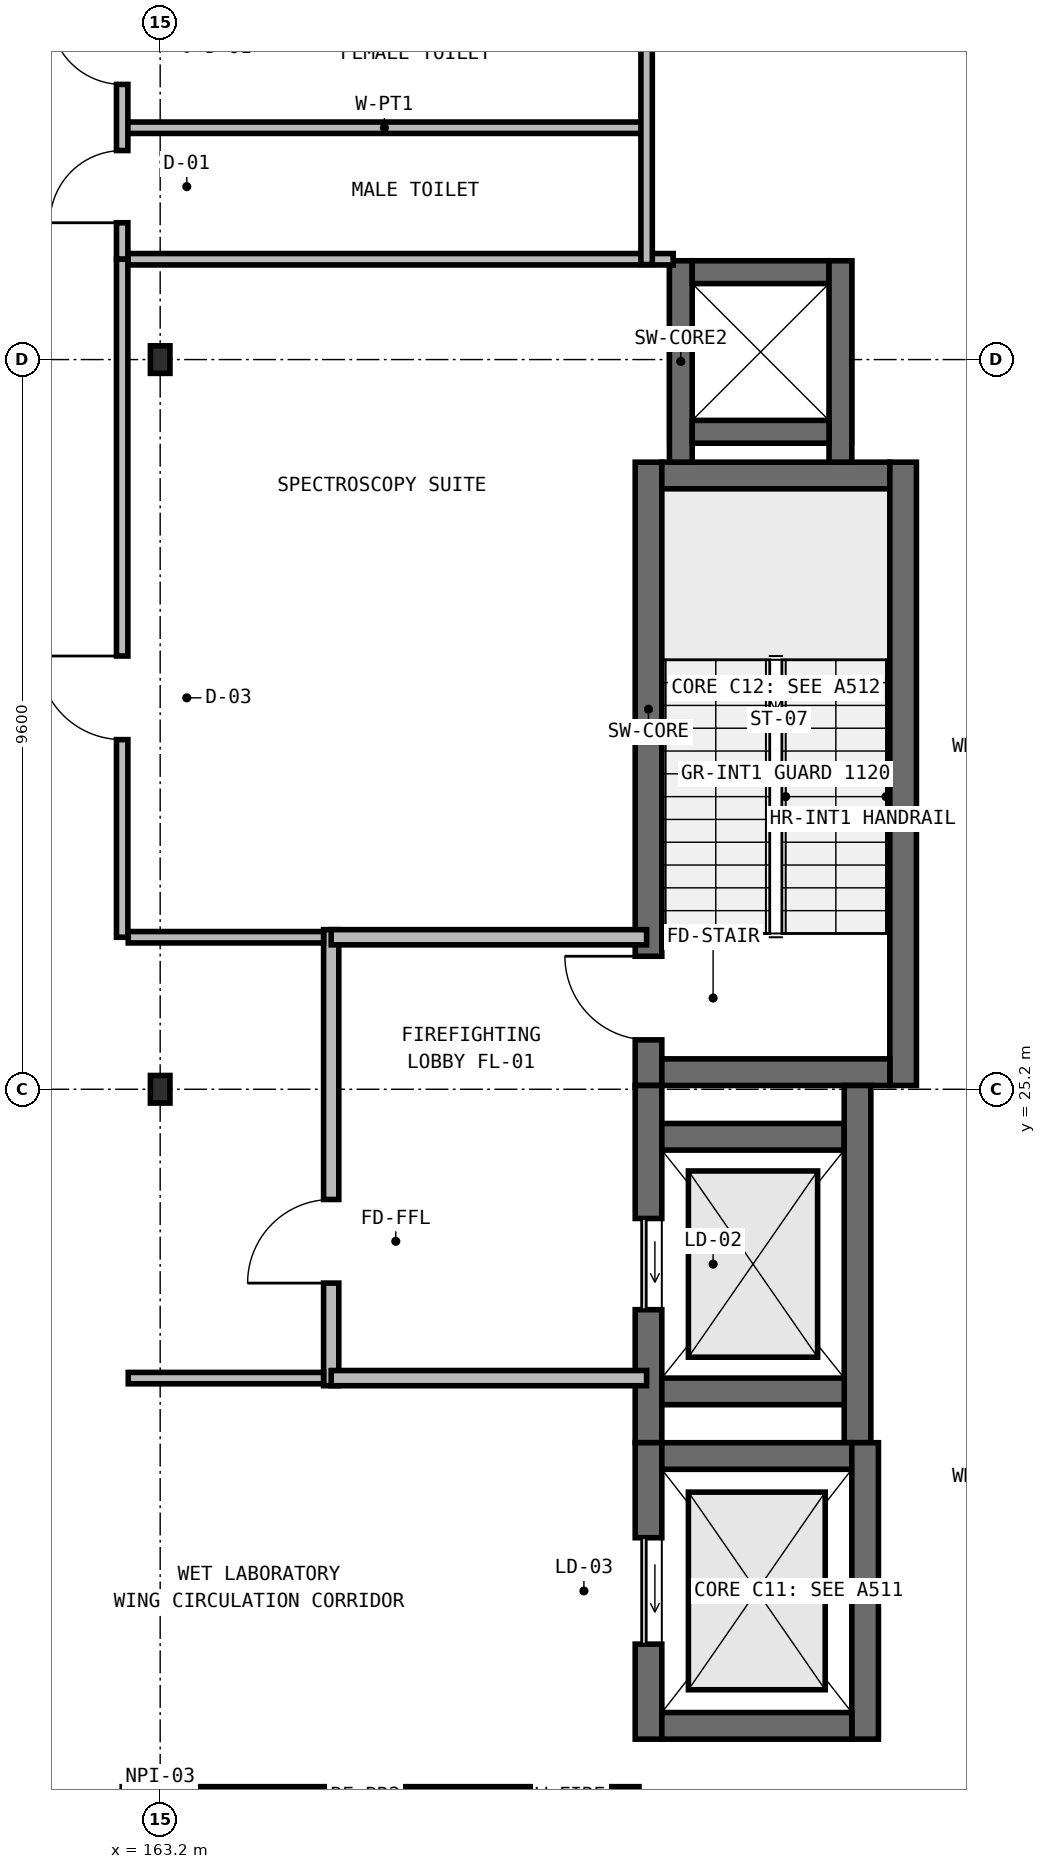
"""IFC4 building model, lengths in metres.
Left out: names, types, materials, properties, quantities, classifications, styles, units other than length and angle.
Written with IfcOpenShell. Run it as: python <this file> out.ifc"""

import sys

from ifc_helpers import new_model, si_unit, direction, frame, frame_2d, origin, origin_2d, place, context, subcontext, project, spatial, rectangle, i_section, extrude, element, fill, save


model = new_model("IFC4")
c1 = context("Model", 3, precision=1e-05, world=origin(), true_north=direction((0.0, 1.0)))
c2 = subcontext(c1, "Body", "Model", "MODEL_VIEW")
j1 = project(units=[si_unit("LENGTHUNIT", "METRE"), si_unit("PLANEANGLEUNIT", "RADIAN")], contexts=[c1])
p1 = place(None, origin())
s1 = spatial("IfcSite", under=j1, at=p1, CompositionType="ELEMENT")
p2 = place(p1, origin())
s2 = spatial("IfcBuilding", under=s1, at=p2, CompositionType="ELEMENT")
p3 = place(p2, frame((0.0, 0.0, 32.55)))
s3 = spatial("IfcBuildingStorey", under=s2, at=p3, CompositionType="ELEMENT", Elevation=32.55)
p4 = place(p3, frame((169.625, 25.25, 0.0), z_axis=(0.0, 0.0, 1.0), x_axis=(0.0, 1.0, 0.0)))
e1 = element("IfcWall", 1, at=p4, inside=s3, PredefinedType="SHEAR", context=c2, shape_type="SweptSolid", body=[
    extrude(rectangle(XDim=8.2, YDim=0.35, at=frame_2d((4.1, 0.0))), origin(), (0.0, 0.0, 1.0), 4.55),
])
p5 = place(p4, frame((0.6, 0.0, 0.0)))
e2 = element("IfcOpeningElement", 2, at=p5, cuts=e1, PredefinedType="OPENING", context=c2, shape_type="SweptSolid", body=[
    extrude(rectangle(XDim=1.1, YDim=2.15, at=frame_2d((0.55, 1.075))), frame((0.0, 0.185, 0.0), z_axis=(0.0, -1.0, 0.0), x_axis=(1.0, 0.0, 0.0)), (0.0, 0.0, 1.0), 0.37),
])
p6 = place(p3, frame((169.8, 33.275, 0.0), z_axis=(0.0, 0.0, 1.0), x_axis=(1.0, 0.0, 0.0)))
e3 = element("IfcWall", 3, at=p6, inside=s3, PredefinedType="SHEAR", context=c2, shape_type="SweptSolid", body=[
    extrude(rectangle(XDim=3.0, YDim=0.35, at=frame_2d((1.5, 0.0))), origin(), (0.0, 0.0, 1.0), 4.55),
])
p7 = place(p3, frame((172.975, 33.45, 0.0), z_axis=(0.0, 0.0, 1.0), x_axis=(0.0, -1.0, 0.0)))
e4 = element("IfcWall", 4, at=p7, inside=s3, PredefinedType="SHEAR", context=c2, shape_type="SweptSolid", body=[
    extrude(rectangle(XDim=8.2, YDim=0.35, at=frame_2d((4.1, 0.0))), origin(), (0.0, 0.0, 1.0), 4.55),
])
p8 = place(p3, frame((172.8, 25.425, 0.0), z_axis=(0.0, 0.0, 1.0), x_axis=(-1.0, 0.0, 0.0)))
e5 = element("IfcWall", 5, at=p8, inside=s3, PredefinedType="SHEAR", context=c2, shape_type="SweptSolid", body=[
    extrude(rectangle(XDim=3.0, YDim=0.35, at=frame_2d((1.5, 0.0))), origin(), (0.0, 0.0, 1.0), 4.55),
])
p9 = place(p3, frame((169.625, 20.55, 0.0), z_axis=(0.0, 0.0, 1.0), x_axis=(0.0, 1.0, 0.0)))
e6 = element("IfcWall", 6, at=p9, inside=s3, PredefinedType="SHEAR", context=c2, shape_type="SweptSolid", body=[
    extrude(rectangle(XDim=4.7, YDim=0.35, at=frame_2d((2.35, 0.0))), origin(), (0.0, 0.0, 1.0), 4.55),
])
p10 = place(p9, frame((1.75, 0.0, 0.0)))
e7 = element("IfcOpeningElement", 7, at=p10, cuts=e6, PredefinedType="OPENING", context=c2, shape_type="SweptSolid", body=[
    extrude(rectangle(XDim=1.2, YDim=2.15, at=frame_2d((0.6, 1.075))), frame((0.0, 0.185, 0.0), z_axis=(0.0, -1.0, 0.0), x_axis=(1.0, 0.0, 0.0)), (0.0, 0.0, 1.0), 0.37),
])
p11 = place(p3, frame((169.8, 24.575, 0.0), z_axis=(0.0, 0.0, 1.0), x_axis=(1.0, 0.0, 0.0)))
e8 = element("IfcWall", 8, at=p11, inside=s3, PredefinedType="SHEAR", context=c2, shape_type="SweptSolid", body=[
    extrude(rectangle(XDim=2.4, YDim=0.35, at=frame_2d((1.2, 0.0))), origin(), (0.0, 0.0, 1.0), 4.55),
])
p12 = place(p3, frame((172.375, 25.25, 0.0), z_axis=(0.0, 0.0, 1.0), x_axis=(0.0, -1.0, 0.0)))
e9 = element("IfcWall", 9, at=p12, inside=s3, PredefinedType="SHEAR", context=c2, shape_type="SweptSolid", body=[
    extrude(rectangle(XDim=4.7, YDim=0.35, at=frame_2d((2.35, 0.0))), origin(), (0.0, 0.0, 1.0), 4.55),
])
p13 = place(p3, frame((172.2, 21.225, 0.0), z_axis=(0.0, 0.0, 1.0), x_axis=(-1.0, 0.0, 0.0)))
e10 = element("IfcWall", 10, at=p13, inside=s3, PredefinedType="SHEAR", context=c2, shape_type="SweptSolid", body=[
    extrude(rectangle(XDim=2.4, YDim=0.35, at=frame_2d((1.2, 0.0))), origin(), (0.0, 0.0, 1.0), 4.55),
])
p14 = place(p3, frame((169.625, 16.65, 0.0), z_axis=(0.0, 0.0, 1.0), x_axis=(0.0, 1.0, 0.0)))
e11 = element("IfcWall", 11, at=p14, inside=s3, PredefinedType="SHEAR", context=c2, shape_type="SweptSolid", body=[
    extrude(rectangle(XDim=3.9, YDim=0.35, at=frame_2d((1.95, 0.0))), origin(), (0.0, 0.0, 1.0), 4.55),
])
p15 = place(p14, frame((1.25, 0.0, 0.0)))
e12 = element("IfcOpeningElement", 12, at=p15, cuts=e11, PredefinedType="OPENING", context=c2, shape_type="SweptSolid", body=[
    extrude(rectangle(XDim=1.4, YDim=2.3, at=frame_2d((0.7, 1.15))), frame((0.0, 0.185, 0.0), z_axis=(0.0, -1.0, 0.0), x_axis=(1.0, 0.0, 0.0)), (0.0, 0.0, 1.0), 0.37),
])
p16 = place(p3, frame((169.8, 20.375, 0.0), z_axis=(0.0, 0.0, 1.0), x_axis=(1.0, 0.0, 0.0)))
e13 = element("IfcWall", 13, at=p16, inside=s3, PredefinedType="SHEAR", context=c2, shape_type="SweptSolid", body=[
    extrude(rectangle(XDim=2.5, YDim=0.35, at=frame_2d((1.25, 0.0))), origin(), (0.0, 0.0, 1.0), 4.55),
])
p17 = place(p3, frame((172.475, 20.55, 0.0), z_axis=(0.0, 0.0, 1.0), x_axis=(0.0, -1.0, 0.0)))
e14 = element("IfcWall", 14, at=p17, inside=s3, PredefinedType="SHEAR", context=c2, shape_type="SweptSolid", body=[
    extrude(rectangle(XDim=3.9, YDim=0.35, at=frame_2d((1.95, 0.0))), origin(), (0.0, 0.0, 1.0), 4.55),
])
p18 = place(p3, frame((172.3, 16.825, 0.0), z_axis=(0.0, 0.0, 1.0), x_axis=(-1.0, 0.0, 0.0)))
e15 = element("IfcWall", 15, at=p18, inside=s3, PredefinedType="SHEAR", context=c2, shape_type="SweptSolid", body=[
    extrude(rectangle(XDim=2.5, YDim=0.35, at=frame_2d((1.25, 0.0))), origin(), (0.0, 0.0, 1.0), 4.55),
])
for number, where, z_axis, x_axis in (
    (16, (163.2, 25.2, 0.0), (0.0, 0.0, 1.0), (1.0, 0.0, 0.0)),
    (17, (163.2, 34.8, 0.0), (0.0, 0.0, 1.0), (1.0, 0.0, 0.0)),
):
    element("IfcColumn", number, at=place(p3, frame(where, z_axis=z_axis, x_axis=x_axis)), inside=s3, PredefinedType="COLUMN", context=c2, shape_type="SweptSolid", body=[
        extrude(i_section(OverallWidth=0.257, OverallDepth=0.363, WebThickness=0.013, FlangeThickness=0.022, at=origin_2d()), origin(), (0.0, 0.0, 1.0), 4.55),
    ])
p19 = place(p3, frame((170.05, 33.45, 0.0), z_axis=(0.0, 0.0, 1.0), x_axis=(0.0, 1.0, 0.0)))
e18 = element("IfcWall", 18, at=p19, inside=s3, PredefinedType="SHEAR", context=c2, shape_type="SweptSolid", body=[
    extrude(rectangle(XDim=2.65, YDim=0.3, at=frame_2d((1.325, 0.0))), origin(), (0.0, 0.0, 1.0), 4.37),
])
p20 = place(p3, frame((170.2, 35.95, 0.0), z_axis=(0.0, 0.0, 1.0), x_axis=(1.0, 0.0, 0.0)))
e19 = element("IfcWall", 19, at=p20, inside=s3, PredefinedType="SHEAR", context=c2, shape_type="SweptSolid", body=[
    extrude(rectangle(XDim=1.8, YDim=0.3, at=frame_2d((0.9, 0.0))), origin(), (0.0, 0.0, 1.0), 4.37),
])
p21 = place(p3, frame((172.15, 36.1, 0.0), z_axis=(0.0, 0.0, 1.0), x_axis=(0.0, -1.0, 0.0)))
e20 = element("IfcWall", 20, at=p21, inside=s3, PredefinedType="SHEAR", context=c2, shape_type="SweptSolid", body=[
    extrude(rectangle(XDim=2.65, YDim=0.3, at=frame_2d((1.325, 0.0))), origin(), (0.0, 0.0, 1.0), 4.37),
])
p22 = place(p3, frame((172.0, 33.85, 0.0), z_axis=(0.0, 0.0, 1.0), x_axis=(-1.0, 0.0, 0.0)))
e21 = element("IfcWall", 21, at=p22, inside=s3, PredefinedType="SHEAR", context=c2, shape_type="SweptSolid", body=[
    extrude(rectangle(XDim=1.8, YDim=0.3, at=frame_2d((0.9, 0.0))), origin(), (0.0, 0.0, 1.0), 4.37),
])
p23 = place(p3, frame((165.45, 21.3, 0.0), z_axis=(0.0, 0.0, 1.0), x_axis=(0.0, 1.0, 0.0)))
e22 = element("IfcWall", 22, at=p23, inside=s3, PredefinedType="SOLIDWALL", context=c2, shape_type="SweptSolid", body=[
    extrude(rectangle(XDim=6.0, YDim=0.2, at=frame_2d((3.0, 0.0))), origin(), (0.0, 0.0, 1.0), 4.3),
])
p24 = place(p23, frame((1.35, 0.0, 0.0)))
e23 = element("IfcOpeningElement", 23, at=p24, cuts=e22, PredefinedType="OPENING", context=c2, shape_type="SweptSolid", body=[
    extrude(rectangle(XDim=1.1, YDim=2.15, at=frame_2d((0.55, 1.075))), frame((0.0, 0.11, 0.0), z_axis=(0.0, -1.0, 0.0), x_axis=(1.0, 0.0, 0.0)), (0.0, 0.0, 1.0), 0.22),
])
for number, where, z_axis, x_axis in (
    (24, (165.45, 21.4, 0.0), (0.0, 0.0, 1.0), (1.0, 0.0, 0.0)),
    (25, (165.45, 27.2, 0.0), (0.0, 0.0, 1.0), (1.0, 0.0, 0.0)),
):
    element("IfcWall", number, at=place(p3, frame(where, z_axis=z_axis, x_axis=x_axis)), inside=s3, PredefinedType="SOLIDWALL", context=c2, shape_type="SweptSolid", body=[
        extrude(rectangle(XDim=4.15, YDim=0.2, at=frame_2d((2.075, 0.0))), origin(), (0.0, 0.0, 1.0), 4.3),
    ])
p25 = place(p3, frame((162.7, 37.85, 0.0), z_axis=(0.0, 0.0, 1.0), x_axis=(1.0, 0.0, 0.0)))
e26 = element("IfcWall", 26, at=p25, inside=s3, PredefinedType="PARTITIONING", context=c2, shape_type="SweptSolid", body=[
    extrude(rectangle(XDim=6.9, YDim=0.15, at=frame_2d((3.45, 0.0))), origin(), (0.0, 0.0, 1.0), 4.3),
])
p26 = place(p3, frame((162.7, 36.12, 0.0), z_axis=(0.0, 0.0, 1.0), x_axis=(1.0, 0.0, 0.0)))
e27 = element("IfcWall", 27, at=p26, inside=s3, PredefinedType="PARTITIONING", context=c2, shape_type="SweptSolid", body=[
    extrude(rectangle(XDim=7.25, YDim=0.15, at=frame_2d((3.625, 0.0))), origin(), (0.0, 0.0, 1.0), 4.3),
])
p27 = place(p3, frame((169.6, 36.05, 0.0), z_axis=(0.0, 0.0, 1.0), x_axis=(0.0, 1.0, 0.0)))
e28 = element("IfcWall", 28, at=p27, inside=s3, PredefinedType="PARTITIONING", context=c2, shape_type="SweptSolid", body=[
    extrude(rectangle(XDim=5.5, YDim=0.15, at=frame_2d((2.75, 0.0))), origin(), (0.0, 0.0, 1.0), 4.3),
])
p28 = place(p3, frame((162.7, 36.12, 0.0), z_axis=(0.0, 0.0, 1.0), x_axis=(0.0, 1.0, 0.0)))
e29 = element("IfcWall", 29, at=p28, inside=s3, PredefinedType="PARTITIONING", context=c2, shape_type="SweptSolid", body=[
    extrude(rectangle(XDim=5.4, YDim=0.15, at=frame_2d((2.7, 0.0))), origin(), (0.0, 0.0, 1.0), 4.3),
])
p29 = place(p28, frame((0.48, 0.0, 0.0)))
e30 = element("IfcOpeningElement", 30, at=p29, cuts=e29, PredefinedType="OPENING", context=c2, shape_type="SweptSolid", body=[
    extrude(rectangle(XDim=0.95, YDim=2.1, at=frame_2d((0.475, 1.05))), frame((0.0, 0.085, 0.0), z_axis=(0.0, -1.0, 0.0), x_axis=(1.0, 0.0, 0.0)), (0.0, 0.0, 1.0), 0.17),
])
p30 = place(p28, frame((2.3, 0.0, 0.0)))
e31 = element("IfcOpeningElement", 31, at=p30, cuts=e29, PredefinedType="OPENING", context=c2, shape_type="SweptSolid", body=[
    extrude(rectangle(XDim=0.95, YDim=2.1, at=frame_2d((0.475, 1.05))), frame((0.0, 0.085, 0.0), z_axis=(0.0, -1.0, 0.0), x_axis=(1.0, 0.0, 0.0)), (0.0, 0.0, 1.0), 0.17),
])
p31 = place(p28, frame((4.1, 0.0, 0.0)))
e32 = element("IfcOpeningElement", 32, at=p31, cuts=e29, PredefinedType="OPENING", context=c2, shape_type="SweptSolid", body=[
    extrude(rectangle(XDim=0.95, YDim=2.1, at=frame_2d((0.475, 1.05))), frame((0.0, 0.085, 0.0), z_axis=(0.0, -1.0, 0.0), x_axis=(1.0, 0.0, 0.0)), (0.0, 0.0, 1.0), 0.17),
])
p32 = place(p3, frame((162.78, 27.2, 0.0), z_axis=(0.0, 0.0, 1.0), x_axis=(1.0, 0.0, 0.0)))
e33 = element("IfcWall", 33, at=p32, inside=s3, PredefinedType="PARTITIONING", context=c2, shape_type="SweptSolid", body=[
    extrude(rectangle(XDim=2.57, YDim=0.15, at=frame_2d((1.285, 0.0))), origin(), (0.0, 0.0, 1.0), 4.3),
])
p33 = place(p3, frame((162.7, 27.2, 0.0), z_axis=(0.0, 0.0, 1.0), x_axis=(0.0, 1.0, 0.0)))
e34 = element("IfcWall", 34, at=p33, inside=s3, PredefinedType="PARTITIONING", context=c2, shape_type="SweptSolid", body=[
    extrude(rectangle(XDim=8.92, YDim=0.15, at=frame_2d((4.46, 0.0))), origin(), (0.0, 0.0, 1.0), 4.3),
])
p34 = place(p33, frame((2.6, 0.0, 0.0)))
e35 = element("IfcOpeningElement", 35, at=p34, cuts=e34, PredefinedType="OPENING", context=c2, shape_type="SweptSolid", body=[
    extrude(rectangle(XDim=1.1, YDim=2.2, at=frame_2d((0.55, 1.1))), frame((0.0, 0.085, 0.0), z_axis=(0.0, -1.0, 0.0), x_axis=(1.0, 0.0, 0.0)), (0.0, 0.0, 1.0), 0.17),
])
p35 = place(p3, frame((162.78, 21.4, 0.0), z_axis=(0.0, 0.0, 1.0), x_axis=(1.0, 0.0, 0.0)))
e36 = element("IfcWall", 36, at=p35, inside=s3, PredefinedType="PARTITIONING", context=c2, shape_type="SweptSolid", body=[
    extrude(rectangle(XDim=2.57, YDim=0.15, at=frame_2d((1.285, 0.0))), origin(), (0.0, 0.0, 1.0), 4.3),
])
p36 = place(p3, frame((162.7, 15.95, 0.0), z_axis=(0.0, 0.0, 1.0), x_axis=(1.0, 0.0, 0.0)))
e37 = element("IfcWall", 37, at=p36, inside=s3, PredefinedType="PARTITIONING", context=c2, shape_type="SweptSolid", body=[
    extrude(rectangle(XDim=6.8, YDim=0.15, at=frame_2d((3.4, 0.0))), origin(), (0.0, 0.0, 1.0), 4.3),
])
p37 = place(p5, origin())
e38 = element("IfcDoor", 38, at=p37, inside=s3, OperationType="SINGLE_SWING_RIGHT", PredefinedType="DOOR", context=c2, shape_type="SweptSolid", body=[
    extrude(rectangle(XDim=1.1, YDim=2.15, at=frame_2d((0.55, 1.075))), frame((0.0, 0.025, 0.0), z_axis=(0.0, -1.0, 0.0), x_axis=(1.0, 0.0, 0.0)), (0.0, 0.0, 1.0), 0.05),
])
fill(e2, e38)
p38 = place(p10, origin())
e39 = element("IfcDoor", 39, at=p38, inside=s3, OperationType="SLIDING_TO_LEFT", PredefinedType="USERDEFINED", context=c2, shape_type="SweptSolid", body=[
    extrude(rectangle(XDim=1.2, YDim=2.15, at=frame_2d((0.6, 1.075))), frame((0.0, 0.025, 0.0), z_axis=(0.0, -1.0, 0.0), x_axis=(1.0, 0.0, 0.0)), (0.0, 0.0, 1.0), 0.05),
])
fill(e7, e39)
p39 = place(p15, origin())
e40 = element("IfcDoor", 40, at=p39, inside=s3, OperationType="SLIDING_TO_LEFT", PredefinedType="USERDEFINED", context=c2, shape_type="SweptSolid", body=[
    extrude(rectangle(XDim=1.4, YDim=2.3, at=frame_2d((0.7, 1.15))), frame((0.0, 0.025, 0.0), z_axis=(0.0, -1.0, 0.0), x_axis=(1.0, 0.0, 0.0)), (0.0, 0.0, 1.0), 0.05),
])
fill(e12, e40)
p40 = place(p24, origin())
e41 = element("IfcDoor", 41, at=p40, inside=s3, OperationType="SINGLE_SWING_LEFT", PredefinedType="DOOR", context=c2, shape_type="SweptSolid", body=[
    extrude(rectangle(XDim=1.1, YDim=2.15, at=frame_2d((0.55, 1.075))), frame((0.0, 0.025, 0.0), z_axis=(0.0, -1.0, 0.0), x_axis=(1.0, 0.0, 0.0)), (0.0, 0.0, 1.0), 0.05),
])
fill(e23, e41)
p41 = place(p29, origin())
e42 = element("IfcDoor", 42, at=p41, inside=s3, OperationType="SINGLE_SWING_LEFT", PredefinedType="DOOR", context=c2, shape_type="SweptSolid", body=[
    extrude(rectangle(XDim=0.95, YDim=2.1, at=frame_2d((0.475, 1.05))), frame((0.0, 0.025, 0.0), z_axis=(0.0, -1.0, 0.0), x_axis=(1.0, 0.0, 0.0)), (0.0, 0.0, 1.0), 0.05),
])
fill(e30, e42)
p42 = place(p30, origin())
e43 = element("IfcDoor", 43, at=p42, inside=s3, OperationType="SINGLE_SWING_RIGHT", PredefinedType="DOOR", context=c2, shape_type="SweptSolid", body=[
    extrude(rectangle(XDim=0.95, YDim=2.1, at=frame_2d((0.475, 1.05))), frame((0.0, 0.025, 0.0), z_axis=(0.0, -1.0, 0.0), x_axis=(1.0, 0.0, 0.0)), (0.0, 0.0, 1.0), 0.05),
])
fill(e31, e43)
p43 = place(p34, origin())
e44 = element("IfcDoor", 44, at=p43, inside=s3, OperationType="SINGLE_SWING_RIGHT", PredefinedType="DOOR", context=c2, shape_type="SweptSolid", body=[
    extrude(rectangle(XDim=1.1, YDim=2.2, at=frame_2d((0.55, 1.1))), frame((0.0, 0.025, 0.0), z_axis=(0.0, -1.0, 0.0), x_axis=(1.0, 0.0, 0.0)), (0.0, 0.0, 1.0), 0.05),
])
fill(e35, e44)
save(model, sys.argv[1])
